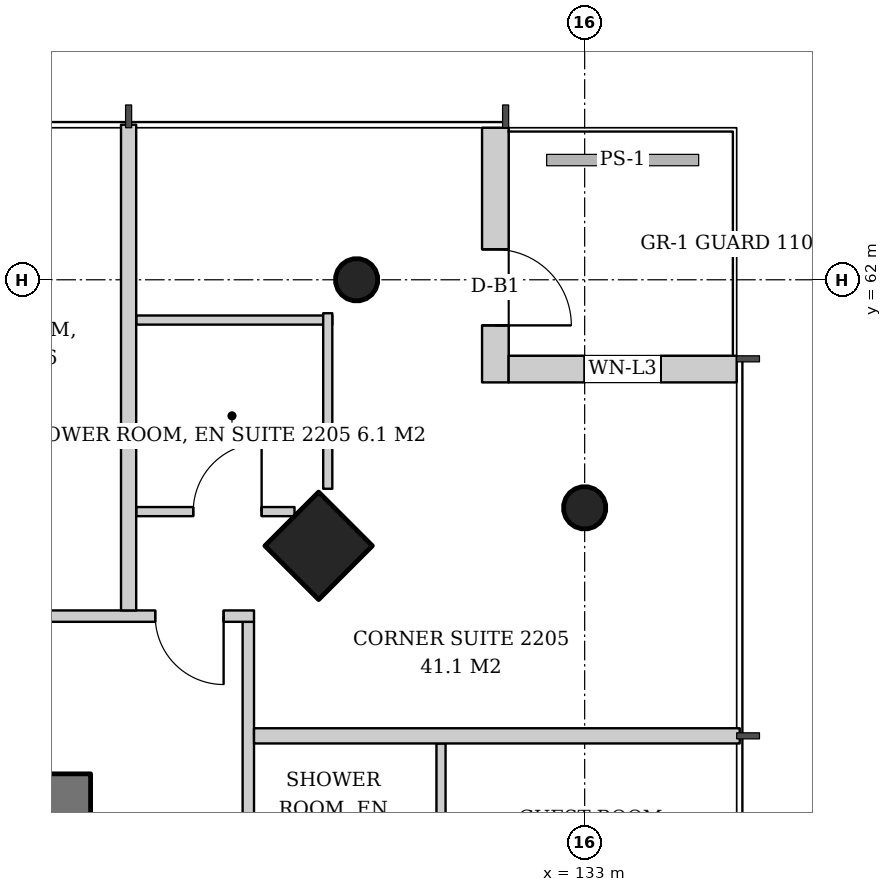
"""IFC4 building model, lengths in metres.
Left out: names, types, materials, properties, quantities, classifications, styles, units other than length and angle.
Written with IfcOpenShell. Run it as: python <this file> out.ifc"""

import sys

from ifc_helpers import new_model, si_unit, direction, frame, frame_2d, origin, origin_2d, place, context, subcontext, project, spatial, rectangle, hollow_circle, extrude, element, fill, save


model = new_model("IFC4")
c1 = context("Model", 3, precision=1e-05, world=origin(), true_north=direction((0.0, 1.0)))
c2 = subcontext(c1, "Body", "Model", "MODEL_VIEW")
j1 = project(units=[si_unit("LENGTHUNIT", "METRE"), si_unit("PLANEANGLEUNIT", "RADIAN")], contexts=[c1])
p1 = place(None, origin())
s1 = spatial("IfcSite", under=j1, at=p1, CompositionType="ELEMENT")
p2 = place(p1, origin())
s2 = spatial("IfcBuilding", under=s1, at=p2, CompositionType="ELEMENT")
p3 = place(p2, frame((0.0, 0.0, 89.4)))
s3 = spatial("IfcBuildingStorey", under=s2, at=p3, CompositionType="ELEMENT", Elevation=89.4)
p4 = place(p3, frame((129.552, 58.552, 0.0), z_axis=(-0.043029647111, -0.043029647111, 0.998146732169), x_axis=(0.707106781187, -0.707106781187, 0.0)))
e1 = element("IfcColumn", 1, at=p4, inside=s3, PredefinedType="COLUMN", context=c2, shape_type="SweptSolid", body=[
    extrude(rectangle(XDim=1.0, YDim=1.0, at=origin_2d()), origin(), (0.0, 0.0, 1.0), 3.807),
])
for number, where, z_axis, x_axis in (
    (2, (133.052, 59.052, 0.0), (-0.043, -0.043, 0.998), (0.707, -0.707, 0.0)),
    (3, (130.052, 62.052, 0.0), (-0.043, -0.043, 0.998), (0.707, -0.707, 0.0)),
):
    element("IfcColumn", number, at=place(p3, frame(where, z_axis=z_axis, x_axis=x_axis)), inside=s3, PredefinedType="COLUMN", context=c2, shape_type="SweptSolid", body=[
        extrude(hollow_circle(Radius=0.28, WallThickness=0.02, at=origin_2d()), origin(), (0.0, 0.0, 1.0), 3.807),
    ])
p5 = place(p3, frame((107.5, 55.2, 0.0), z_axis=(0.0, 0.0, 1.0), x_axis=(1.0, 0.0, 0.0)))
e4 = element("IfcWall", 4, at=p5, inside=s3, PredefinedType="SHEAR", context=c2, shape_type="SweptSolid", body=[
    extrude(rectangle(XDim=19.0, YDim=0.6, at=frame_2d((9.5, 0.0))), origin(), (0.0, 0.0, 1.0), 3.8),
])
p6 = place(p5, frame((14.14, 0.0, 0.0)))
e5 = element("IfcOpeningElement", 5, at=p6, cuts=e4, PredefinedType="OPENING", context=c2, shape_type="SweptSolid", body=[
    extrude(rectangle(XDim=1.0, YDim=2.1, at=frame_2d((0.5, 1.05))), frame((0.0, 0.31, 0.0), z_axis=(0.0, -1.0, 0.0), x_axis=(1.0, 0.0, 0.0)), (0.0, 0.0, 1.0), 0.62),
])
p7 = place(p5, frame((2.425, 0.0, 0.0)))
e6 = element("IfcOpeningElement", 6, at=p7, cuts=e4, PredefinedType="OPENING", context=c2, shape_type="SweptSolid", body=[
    extrude(rectangle(XDim=1.0, YDim=2.1, at=frame_2d((0.5, 1.05))), frame((0.0, 0.31, 0.0), z_axis=(0.0, -1.0, 0.0), x_axis=(1.0, 0.0, 0.0)), (0.0, 0.0, 1.0), 0.62),
])
p8 = place(p3, frame((131.825, 64.0, 0.0), z_axis=(0.0, 0.0, 1.0), x_axis=(0.0, -1.0, 0.0)))
e7 = element("IfcWall", 7, at=p8, inside=s3, PredefinedType="SOLIDWALL", context=c2, shape_type="SweptSolid", body=[
    extrude(rectangle(XDim=3.35, YDim=0.35, at=frame_2d((1.675, 0.0))), origin(), (0.0, 0.0, 1.0), 3.6),
])
p9 = place(p8, frame((1.6, 0.0, 0.0)))
e8 = element("IfcOpeningElement", 8, at=p9, cuts=e7, PredefinedType="OPENING", context=c2, shape_type="SweptSolid", body=[
    extrude(rectangle(XDim=1.0, YDim=2.4, at=frame_2d((0.5, 1.2))), frame((0.0, 0.185, 0.0), z_axis=(0.0, -1.0, 0.0), x_axis=(1.0, 0.0, 0.0)), (0.0, 0.0, 1.0), 0.37),
])
p10 = place(p3, frame((132.0, 60.825, 0.0), z_axis=(0.0, 0.0, 1.0), x_axis=(1.0, 0.0, 0.0)))
e9 = element("IfcWall", 9, at=p10, inside=s3, PredefinedType="SOLIDWALL", context=c2, shape_type="SweptSolid", body=[
    extrude(rectangle(XDim=3.0, YDim=0.35, at=frame_2d((1.5, 0.0))), origin(), (0.0, 0.0, 1.0), 3.6),
])
p11 = place(p10, frame((1.0, 0.0, 0.9)))
e10 = element("IfcOpeningElement", 10, at=p11, cuts=e9, PredefinedType="OPENING", context=c2, shape_type="SweptSolid", body=[
    extrude(rectangle(XDim=1.0, YDim=2.4, at=frame_2d((0.5, 1.2))), frame((0.0, 0.185, 0.0), z_axis=(0.0, -1.0, 0.0), x_axis=(1.0, 0.0, 0.0)), (0.0, 0.0, 1.0), 0.37),
])
p12 = place(p3, frame((131.11, 53.48, 0.0), z_axis=(0.0, 0.0, 1.0), x_axis=(0.0, 1.0, 0.0)))
e11 = element("IfcWall", 11, at=p12, inside=s3, PredefinedType="PARTITIONING", context=c2, shape_type="SweptSolid", body=[
    extrude(rectangle(XDim=2.42, YDim=0.12, at=frame_2d((1.21, 0.0))), origin(), (0.0, 0.0, 1.0), 3.0),
])
p13 = place(p3, frame((128.575, 34.35, 0.0), z_axis=(0.0, 0.0, 1.0), x_axis=(0.0, 1.0, 0.0)))
e12 = element("IfcWall", 12, at=p13, inside=s3, PredefinedType="PARTITIONING", context=c2, shape_type="SweptSolid", body=[
    extrude(rectangle(XDim=23.15, YDim=0.15, at=frame_2d((11.575, 0.0))), origin(), (0.0, 0.0, 1.0), 2.9),
])
p14 = place(p13, frame((0.4, 0.0, 0.0)))
e13 = element("IfcOpeningElement", 13, at=p14, cuts=e12, PredefinedType="OPENING", context=c2, shape_type="SweptSolid", body=[
    extrude(rectangle(XDim=0.9, YDim=2.1, at=frame_2d((0.45, 1.05))), frame((0.0, 0.085, 0.0), z_axis=(0.0, -1.0, 0.0), x_axis=(1.0, 0.0, 0.0)), (0.0, 0.0, 1.0), 0.17),
])
p15 = place(p13, frame((8.0, 0.0, 0.0)))
e14 = element("IfcOpeningElement", 14, at=p15, cuts=e12, PredefinedType="OPENING", context=c2, shape_type="SweptSolid", body=[
    extrude(rectangle(XDim=0.9, YDim=2.1, at=frame_2d((0.45, 1.05))), frame((0.0, 0.085, 0.0), z_axis=(0.0, -1.0, 0.0), x_axis=(1.0, 0.0, 0.0)), (0.0, 0.0, 1.0), 0.17),
])
p16 = place(p13, frame((14.4, 0.0, 0.0)))
e15 = element("IfcOpeningElement", 15, at=p16, cuts=e12, PredefinedType="OPENING", context=c2, shape_type="SweptSolid", body=[
    extrude(rectangle(XDim=0.9, YDim=2.1, at=frame_2d((0.45, 1.05))), frame((0.0, 0.085, 0.0), z_axis=(0.0, -1.0, 0.0), x_axis=(1.0, 0.0, 0.0)), (0.0, 0.0, 1.0), 0.17),
])
p17 = place(p13, frame((18.0, 0.0, 0.0)))
e16 = element("IfcOpeningElement", 16, at=p17, cuts=e12, PredefinedType="OPENING", context=c2, shape_type="SweptSolid", body=[
    extrude(rectangle(XDim=0.9, YDim=2.1, at=frame_2d((0.45, 1.05))), frame((0.0, 0.085, 0.0), z_axis=(0.0, -1.0, 0.0), x_axis=(1.0, 0.0, 0.0)), (0.0, 0.0, 1.0), 0.17),
])
p18 = place(p3, frame((128.65, 56.0, 0.0), z_axis=(0.0, 0.0, 1.0), x_axis=(1.0, 0.0, 0.0)))
e17 = element("IfcWall", 17, at=p18, inside=s3, PredefinedType="PARTITIONING", context=c2, shape_type="SweptSolid", body=[
    extrude(rectangle(XDim=6.39, YDim=0.2, at=frame_2d((3.195, 0.0))), origin(), (0.0, 0.0, 1.0), 3.2),
])
p19 = place(p3, frame((127.1, 58.95, 0.0), z_axis=(0.0, 0.0, 1.0), x_axis=(1.0, 0.0, 0.0)))
e18 = element("IfcWall", 18, at=p19, inside=s3, PredefinedType="PARTITIONING", context=c2, shape_type="SweptSolid", body=[
    extrude(rectangle(XDim=2.083, YDim=0.12, at=frame_2d((1.042, 0.0))), origin(), (0.0, 0.0, 1.0), 3.6),
])
p20 = place(p19, frame((0.75, 0.0, 0.0)))
e19 = element("IfcOpeningElement", 19, at=p20, cuts=e18, PredefinedType="OPENING", context=c2, shape_type="SweptSolid", body=[
    extrude(rectangle(XDim=0.9, YDim=2.1, at=frame_2d((0.45, 1.05))), frame((0.0, 0.07, 0.0), z_axis=(0.0, -1.0, 0.0), x_axis=(1.0, 0.0, 0.0)), (0.0, 0.0, 1.0), 0.14),
])
p21 = place(p3, frame((127.1, 61.47, 0.0), z_axis=(0.0, 0.0, 1.0), x_axis=(1.0, 0.0, 0.0)))
e20 = element("IfcWall", 20, at=p21, inside=s3, PredefinedType="PARTITIONING", context=c2, shape_type="SweptSolid", body=[
    extrude(rectangle(XDim=2.58, YDim=0.12, at=frame_2d((1.29, 0.0))), origin(), (0.0, 0.0, 1.0), 3.2),
])
p22 = place(p3, frame((129.62, 59.25, 0.0), z_axis=(0.0, 0.0, 1.0), x_axis=(0.0, 1.0, 0.0)))
e21 = element("IfcWall", 21, at=p22, inside=s3, PredefinedType="PARTITIONING", context=c2, shape_type="SweptSolid", body=[
    extrude(rectangle(XDim=2.31, YDim=0.12, at=frame_2d((1.155, 0.0))), origin(), (0.0, 0.0, 1.0), 3.2),
])
p23 = place(p3, frame((128.65, 57.575, 0.0), z_axis=(0.0, 0.0, 1.0), x_axis=(-1.0, 0.0, 0.0)))
e22 = element("IfcWall", 22, at=p23, inside=s3, PredefinedType="PARTITIONING", context=c2, shape_type="SweptSolid", body=[
    extrude(rectangle(XDim=23.15, YDim=0.15, at=frame_2d((11.575, 0.0))), origin(), (0.0, 0.0, 1.0), 2.9),
])
p24 = place(p23, frame((0.4, 0.0, 0.0)))
e23 = element("IfcOpeningElement", 23, at=p24, cuts=e22, PredefinedType="OPENING", context=c2, shape_type="SweptSolid", body=[
    extrude(rectangle(XDim=0.9, YDim=2.1, at=frame_2d((0.45, 1.05))), frame((0.0, 0.085, 0.0), z_axis=(0.0, -1.0, 0.0), x_axis=(1.0, 0.0, 0.0)), (0.0, 0.0, 1.0), 0.17),
])
p25 = place(p23, frame((3.0, 0.0, 0.0)))
e24 = element("IfcOpeningElement", 24, at=p25, cuts=e22, PredefinedType="OPENING", context=c2, shape_type="SweptSolid", body=[
    extrude(rectangle(XDim=0.9, YDim=2.1, at=frame_2d((0.45, 1.05))), frame((0.0, 0.085, 0.0), z_axis=(0.0, -1.0, 0.0), x_axis=(1.0, 0.0, 0.0)), (0.0, 0.0, 1.0), 0.17),
])
p26 = place(p23, frame((9.4, 0.0, 0.0)))
e25 = element("IfcOpeningElement", 25, at=p26, cuts=e22, PredefinedType="OPENING", context=c2, shape_type="SweptSolid", body=[
    extrude(rectangle(XDim=0.9, YDim=2.1, at=frame_2d((0.45, 1.05))), frame((0.0, 0.085, 0.0), z_axis=(0.0, -1.0, 0.0), x_axis=(1.0, 0.0, 0.0)), (0.0, 0.0, 1.0), 0.17),
])
p27 = place(p23, frame((14.35, 0.0, 0.0)))
e26 = element("IfcOpeningElement", 26, at=p27, cuts=e22, PredefinedType="OPENING", context=c2, shape_type="SweptSolid", body=[
    extrude(rectangle(XDim=1.0, YDim=2.1, at=frame_2d((0.5, 1.05))), frame((0.0, 0.085, 0.0), z_axis=(0.0, -1.0, 0.0), x_axis=(1.0, 0.0, 0.0)), (0.0, 0.0, 1.0), 0.17),
])
p28 = place(p3, frame((127.0, 57.65, 0.0), z_axis=(0.0, 0.0, 1.0), x_axis=(0.0, 1.0, 0.0)))
e27 = element("IfcWall", 27, at=p28, inside=s3, PredefinedType="PARTITIONING", context=c2, shape_type="SweptSolid", body=[
    extrude(rectangle(XDim=6.39, YDim=0.2, at=frame_2d((3.195, 0.0))), origin(), (0.0, 0.0, 1.0), 3.2),
])
p29 = place(p9, origin())
e28 = element("IfcDoor", 28, at=p29, inside=s3, OperationType="SINGLE_SWING_RIGHT", PredefinedType="DOOR", context=c2, shape_type="SweptSolid", body=[
    extrude(rectangle(XDim=1.0, YDim=2.4, at=frame_2d((0.5, 1.2))), frame((0.0, 0.025, 0.0), z_axis=(0.0, -1.0, 0.0), x_axis=(1.0, 0.0, 0.0)), (0.0, 0.0, 1.0), 0.05),
])
fill(e8, e28)
p30 = place(p11, origin())
e29 = element("IfcWindow", 29, at=p30, inside=s3, PartitioningType="SINGLE_PANEL", PredefinedType="WINDOW", context=c2, shape_type="SweptSolid", body=[
    extrude(rectangle(XDim=1.0, YDim=2.4, at=frame_2d((0.5, 1.2))), frame((0.0, 0.03, 0.0), z_axis=(0.0, -1.0, 0.0), x_axis=(1.0, 0.0, 0.0)), (0.0, 0.0, 1.0), 0.06),
])
fill(e10, e29)
p31 = place(p20, origin())
e30 = element("IfcDoor", 30, at=p31, inside=s3, OperationType="SINGLE_SWING_RIGHT", PredefinedType="DOOR", context=c2, shape_type="SweptSolid", body=[
    extrude(rectangle(XDim=0.9, YDim=2.1, at=frame_2d((0.45, 1.05))), frame((0.0, 0.025, 0.0), z_axis=(0.0, -1.0, 0.0), x_axis=(1.0, 0.0, 0.0)), (0.0, 0.0, 1.0), 0.05),
])
fill(e19, e30)
p32 = place(p24, origin())
e31 = element("IfcDoor", 31, at=p32, inside=s3, OperationType="SINGLE_SWING_LEFT", PredefinedType="DOOR", context=c2, shape_type="SweptSolid", body=[
    extrude(rectangle(XDim=0.9, YDim=2.1, at=frame_2d((0.45, 1.05))), frame((0.0, 0.025, 0.0), z_axis=(0.0, -1.0, 0.0), x_axis=(1.0, 0.0, 0.0)), (0.0, 0.0, 1.0), 0.05),
])
fill(e23, e31)
save(model, sys.argv[1])
